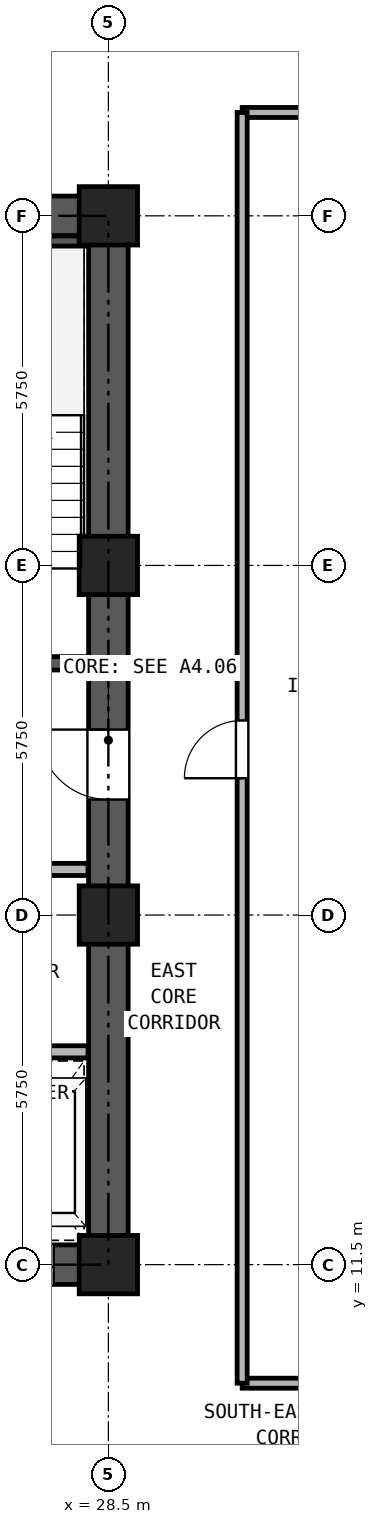
"""IFC4 building model, lengths in metres.
Left out: names, types, materials, properties, quantities, classifications, styles, units other than length and angle.
Written with IfcOpenShell. Run it as: python <this file> out.ifc"""

import sys

from ifc_helpers import new_model, si_unit, direction, frame, frame_2d, origin, origin_2d, place, context, subcontext, project, spatial, rectangle, hollow_rectangle, extrude, source, transform, mapped, element, fill, save


model = new_model("IFC4")
c1 = context("Model", 3, precision=1e-05, world=origin(), true_north=direction((0.0, 1.0)))
c2 = subcontext(c1, "Body", "Model", "MODEL_VIEW")
j1 = project(units=[si_unit("LENGTHUNIT", "METRE"), si_unit("PLANEANGLEUNIT", "RADIAN")], contexts=[c1])
p1 = place(None, origin())
s1 = spatial("IfcSite", under=j1, at=p1, CompositionType="ELEMENT")
p2 = place(p1, origin())
s2 = spatial("IfcBuilding", under=s1, at=p2, CompositionType="ELEMENT")
p3 = place(p2, frame((0.0, 0.0, 62.1)))
s3 = spatial("IfcBuildingStorey", under=s2, at=p3, CompositionType="ELEMENT", Elevation=62.1)
m1 = source(origin(), c2, "Body", "SweptSolid", [
    extrude(hollow_rectangle(XDim=0.96, YDim=0.96, WallThickness=0.06, at=origin_2d()), origin(), (0.0, 0.0, 1.0), 3.32),
])
for number, where, z_axis, x_axis in (
    (1, (28.5, 11.5, 0.0), (0.0, 0.0, 1.0), (1.0, 0.0, 0.0)),
    (2, (28.5, 17.25, 0.0), (0.0, 0.0, 1.0), (1.0, 0.0, 0.0)),
    (3, (28.5, 23.0, 0.0), (0.0, 0.0, 1.0), (1.0, 0.0, 0.0)),
    (4, (28.5, 28.75, 0.0), (0.0, 0.0, 1.0), (1.0, 0.0, 0.0)),
):
    element("IfcColumn", number, at=place(p3, frame(where, z_axis=z_axis, x_axis=x_axis)), inside=s3, PredefinedType="COLUMN", context=c2, shape_type="MappedRepresentation", body=[
        mapped(m1, transform((0.0, 0.0, 0.0), x_axis=(1.0, 0.0, 0.0), y_axis=(0.0, 1.0, 0.0), z_axis=(0.0, 0.0, 1.0), scale=1.0)),
    ])
p4 = place(p3, frame((18.175, 11.5, 0.0), z_axis=(0.0, 0.0, 1.0), x_axis=(1.0, 0.0, 0.0)))
e5 = element("IfcWall", 5, at=p4, inside=s3, PredefinedType="SHEAR", context=c2, shape_type="SweptSolid", body=[
    extrude(rectangle(XDim=10.65, YDim=0.65, at=frame_2d((5.325, 0.0))), origin(), (0.0, 0.0, 1.0), 3.32),
])
p5 = place(p4, frame((1.195, 0.0, 0.0)))
e6 = element("IfcOpeningElement", 6, at=p5, cuts=e5, PredefinedType="OPENING", context=c2, shape_type="SweptSolid", body=[
    extrude(rectangle(XDim=1.1, YDim=2.25, at=frame_2d((0.55, 1.125))), frame((0.0, 0.335, 0.0), z_axis=(0.0, -1.0, 0.0), x_axis=(1.0, 0.0, 0.0)), (0.0, 0.0, 1.0), 0.67),
])
p6 = place(p4, frame((3.495, 0.0, 0.0)))
e7 = element("IfcOpeningElement", 7, at=p6, cuts=e5, PredefinedType="OPENING", context=c2, shape_type="SweptSolid", body=[
    extrude(rectangle(XDim=1.1, YDim=2.25, at=frame_2d((0.55, 1.125))), frame((0.0, 0.335, 0.0), z_axis=(0.0, -1.0, 0.0), x_axis=(1.0, 0.0, 0.0)), (0.0, 0.0, 1.0), 0.67),
])
p7 = place(p4, frame((5.925, 0.0, 0.0)))
e8 = element("IfcOpeningElement", 8, at=p7, cuts=e5, PredefinedType="OPENING", context=c2, shape_type="SweptSolid", body=[
    extrude(rectangle(XDim=1.1, YDim=2.25, at=frame_2d((0.55, 1.125))), frame((0.0, 0.335, 0.0), z_axis=(0.0, -1.0, 0.0), x_axis=(1.0, 0.0, 0.0)), (0.0, 0.0, 1.0), 0.67),
])
p8 = place(p4, frame((8.325, 0.0, 0.0)))
e9 = element("IfcOpeningElement", 9, at=p8, cuts=e5, PredefinedType="OPENING", context=c2, shape_type="SweptSolid", body=[
    extrude(rectangle(XDim=1.1, YDim=2.25, at=frame_2d((0.55, 1.125))), frame((0.0, 0.335, 0.0), z_axis=(0.0, -1.0, 0.0), x_axis=(1.0, 0.0, 0.0)), (0.0, 0.0, 1.0), 0.67),
])
p9 = place(p3, frame((18.175, 28.75, 0.0), z_axis=(0.0, 0.0, 1.0), x_axis=(1.0, 0.0, 0.0)))
e10 = element("IfcWall", 10, at=p9, inside=s3, PredefinedType="SHEAR", context=c2, shape_type="SweptSolid", body=[
    extrude(rectangle(XDim=10.65, YDim=0.65, at=frame_2d((5.325, 0.0))), origin(), (0.0, 0.0, 1.0), 3.32),
])
p10 = place(p9, frame((4.205, 0.0, 0.0)))
e11 = element("IfcOpeningElement", 11, at=p10, cuts=e10, PredefinedType="OPENING", context=c2, shape_type="SweptSolid", body=[
    extrude(rectangle(XDim=0.9, YDim=2.05, at=frame_2d((0.45, 1.025))), frame((0.0, 0.335, 0.0), z_axis=(0.0, -1.0, 0.0), x_axis=(1.0, 0.0, 0.0)), (0.0, 0.0, 1.0), 0.67),
])
p11 = place(p9, frame((5.745, 0.0, 0.0)))
e12 = element("IfcOpeningElement", 12, at=p11, cuts=e10, PredefinedType="OPENING", context=c2, shape_type="SweptSolid", body=[
    extrude(rectangle(XDim=0.9, YDim=2.05, at=frame_2d((0.45, 1.025))), frame((0.0, 0.335, 0.0), z_axis=(0.0, -1.0, 0.0), x_axis=(1.0, 0.0, 0.0)), (0.0, 0.0, 1.0), 0.67),
])
p12 = place(p3, frame((28.5, 11.825, 0.0), z_axis=(0.0, 0.0, 1.0), x_axis=(0.0, 1.0, 0.0)))
e13 = element("IfcWall", 13, at=p12, inside=s3, PredefinedType="SHEAR", context=c2, shape_type="SweptSolid", body=[
    extrude(rectangle(XDim=16.6, YDim=0.65, at=frame_2d((8.3, 0.0))), origin(), (0.0, 0.0, 1.0), 3.32),
])
p13 = place(p12, frame((7.325, 0.0, 0.0)))
e14 = element("IfcOpeningElement", 14, at=p13, cuts=e13, PredefinedType="OPENING", context=c2, shape_type="SweptSolid", body=[
    extrude(rectangle(XDim=1.15, YDim=2.2, at=frame_2d((0.575, 1.1))), frame((0.0, 0.335, 0.0), z_axis=(0.0, -1.0, 0.0), x_axis=(1.0, 0.0, 0.0)), (0.0, 0.0, 1.0), 0.67),
])
p14 = place(p3, frame((25.13, 28.335, 0.0), z_axis=(0.0, 0.0, 1.0), x_axis=(1.0, 0.0, 0.0)))
e15 = element("IfcWall", 15, at=p14, inside=s3, PredefinedType="PARTITIONING", context=c2, shape_type="SweptSolid", body=[
    extrude(rectangle(XDim=3.035, YDim=0.165, at=frame_2d((1.518, 0.0))), origin(), (0.0, 0.0, 1.0), 3.32),
])
p15 = place(p3, frame((25.13, 21.39, 0.0), z_axis=(0.0, 0.0, 1.0), x_axis=(1.0, 0.0, 0.0)))
e16 = element("IfcWall", 16, at=p15, inside=s3, PredefinedType="SOLIDWALL", context=c2, shape_type="SweptSolid", body=[
    extrude(rectangle(XDim=3.035, YDim=0.22, at=frame_2d((1.518, 0.0))), origin(), (0.0, 0.0, 1.0), 3.32),
])
p16 = place(p15, frame((0.92, 0.0, 0.0)))
e17 = element("IfcOpeningElement", 17, at=p16, cuts=e16, PredefinedType="OPENING", context=c2, shape_type="SweptSolid", body=[
    extrude(rectangle(XDim=1.15, YDim=2.2, at=frame_2d((0.575, 1.1))), frame((0.0, 0.12, 0.0), z_axis=(0.0, -1.0, 0.0), x_axis=(1.0, 0.0, 0.0)), (0.0, 0.0, 1.0), 0.24),
])
p17 = place(p3, frame((18.835, 18.0, 0.0), z_axis=(0.0, 0.0, 1.0), x_axis=(1.0, 0.0, 0.0)))
e18 = element("IfcWall", 18, at=p17, inside=s3, PredefinedType="PARTITIONING", context=c2, shape_type="SweptSolid", body=[
    extrude(rectangle(XDim=9.33, YDim=0.2, at=frame_2d((4.665, 0.0))), origin(), (0.0, 0.0, 1.0), 3.32),
])
p18 = place(p17, frame((0.415, 0.0, 0.0)))
e19 = element("IfcOpeningElement", 19, at=p18, cuts=e18, PredefinedType="OPENING", context=c2, shape_type="SweptSolid", body=[
    extrude(rectangle(XDim=1.3, YDim=2.3, at=frame_2d((0.65, 1.15))), frame((0.0, 0.11, 0.0), z_axis=(0.0, -1.0, 0.0), x_axis=(1.0, 0.0, 0.0)), (0.0, 0.0, 1.0), 0.22),
])
p19 = place(p17, frame((2.515, 0.0, 0.0)))
e20 = element("IfcOpeningElement", 20, at=p19, cuts=e18, PredefinedType="OPENING", context=c2, shape_type="SweptSolid", body=[
    extrude(rectangle(XDim=1.3, YDim=2.3, at=frame_2d((0.65, 1.15))), frame((0.0, 0.11, 0.0), z_axis=(0.0, -1.0, 0.0), x_axis=(1.0, 0.0, 0.0)), (0.0, 0.0, 1.0), 0.22),
])
p20 = place(p17, frame((4.915, 0.0, 0.0)))
e21 = element("IfcOpeningElement", 21, at=p20, cuts=e18, PredefinedType="OPENING", context=c2, shape_type="SweptSolid", body=[
    extrude(rectangle(XDim=0.9, YDim=2.05, at=frame_2d((0.45, 1.025))), frame((0.0, 0.11, 0.0), z_axis=(0.0, -1.0, 0.0), x_axis=(1.0, 0.0, 0.0)), (0.0, 0.0, 1.0), 0.22),
])
p21 = place(p17, frame((7.615, 0.0, 0.0)))
e22 = element("IfcOpeningElement", 22, at=p21, cuts=e18, PredefinedType="OPENING", context=c2, shape_type="SweptSolid", body=[
    extrude(rectangle(XDim=0.9, YDim=2.05, at=frame_2d((0.45, 1.025))), frame((0.0, 0.11, 0.0), z_axis=(0.0, -1.0, 0.0), x_axis=(1.0, 0.0, 0.0)), (0.0, 0.0, 1.0), 0.22),
])
p22 = place(p3, frame((18.835, 15.0, 0.0), z_axis=(0.0, 0.0, 1.0), x_axis=(1.0, 0.0, 0.0)))
e23 = element("IfcWall", 23, at=p22, inside=s3, PredefinedType="PARTITIONING", context=c2, shape_type="SweptSolid", body=[
    extrude(rectangle(XDim=9.33, YDim=0.2, at=frame_2d((4.665, 0.0))), origin(), (0.0, 0.0, 1.0), 3.32),
])
for number, where, z_axis, x_axis in (
    (24, (30.7, 9.55, 0.0), (0.0, 0.0, 1.0), (1.0, 0.0, 0.0)),
    (25, (30.7, 30.45, 0.0), (0.0, 0.0, 1.0), (1.0, 0.0, 0.0)),
):
    element("IfcWall", number, at=place(p3, frame(where, z_axis=z_axis, x_axis=x_axis)), inside=s3, PredefinedType="PARTITIONING", context=c2, shape_type="SweptSolid", body=[
        extrude(rectangle(XDim=4.3, YDim=0.165, at=frame_2d((2.15, 0.0))), origin(), (0.0, 0.0, 1.0), 3.32),
    ])
p23 = place(p3, frame((30.7, 9.55, 0.0), z_axis=(0.0, 0.0, 1.0), x_axis=(0.0, 1.0, 0.0)))
e26 = element("IfcWall", 26, at=p23, inside=s3, PredefinedType="PARTITIONING", context=c2, shape_type="SweptSolid", body=[
    extrude(rectangle(XDim=20.9, YDim=0.165, at=frame_2d((10.45, 0.0))), origin(), (0.0, 0.0, 1.0), 3.32),
])
p24 = place(p23, frame((9.95, 0.0, 0.0)))
e27 = element("IfcOpeningElement", 27, at=p24, cuts=e26, PredefinedType="OPENING", context=c2, shape_type="SweptSolid", body=[
    extrude(rectangle(XDim=0.95, YDim=2.15, at=frame_2d((0.475, 1.075))), frame((0.0, 0.093, 0.0), z_axis=(0.0, -1.0, 0.0), x_axis=(1.0, 0.0, 0.0)), (0.0, 0.0, 1.0), 0.185),
])
p25 = place(p13, origin())
e28 = element("IfcDoor", 28, at=p25, inside=s3, OperationType="SINGLE_SWING_RIGHT", PredefinedType="DOOR", context=c2, shape_type="SweptSolid", body=[
    extrude(rectangle(XDim=1.15, YDim=2.2, at=frame_2d((0.575, 1.1))), frame((0.0, 0.025, 0.0), z_axis=(0.0, -1.0, 0.0), x_axis=(1.0, 0.0, 0.0)), (0.0, 0.0, 1.0), 0.05),
])
fill(e14, e28)
p26 = place(p8, frame((1.1, 0.0, 0.0), z_axis=(0.0, 0.0, 1.0), x_axis=(-1.0, 0.0, 0.0)))
e29 = element("IfcDoor", 29, at=p26, inside=s3, OperationType="DOUBLE_DOOR_SLIDING", PredefinedType="DOOR", context=c2, shape_type="SweptSolid", body=[
    extrude(rectangle(XDim=1.1, YDim=2.25, at=frame_2d((0.55, 1.125))), frame((0.0, 0.025, 0.0), z_axis=(0.0, -1.0, 0.0), x_axis=(1.0, 0.0, 0.0)), (0.0, 0.0, 1.0), 0.05),
])
fill(e9, e29)
p27 = place(p24, origin())
e30 = element("IfcDoor", 30, at=p27, inside=s3, OperationType="SINGLE_SWING_LEFT", PredefinedType="DOOR", context=c2, shape_type="SweptSolid", body=[
    extrude(rectangle(XDim=0.95, YDim=2.15, at=frame_2d((0.475, 1.075))), frame((0.0, 0.025, 0.0), z_axis=(0.0, -1.0, 0.0), x_axis=(1.0, 0.0, 0.0)), (0.0, 0.0, 1.0), 0.05),
])
fill(e27, e30)
save(model, sys.argv[1])
